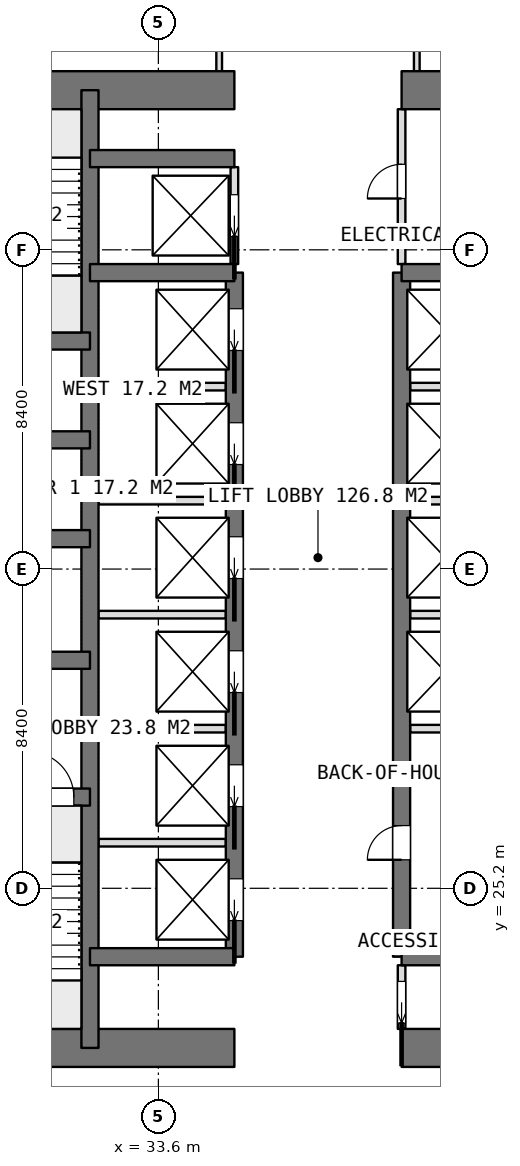
"""IFC4 building model, lengths in metres.
Left out: names, types, materials, properties, quantities, classifications, styles, units other than length and angle.
Written with IfcOpenShell. Run it as: python <this file> out.ifc"""

import sys

from ifc_helpers import new_model, si_unit, direction, frame, frame_2d, origin, place, context, subcontext, project, spatial, rectangle, extrude, element, fill, save


model = new_model("IFC4")
c1 = context("Model", 3, precision=1e-05, world=origin(), true_north=direction((0.0, 1.0)))
c2 = subcontext(c1, "Body", "Model", "MODEL_VIEW")
j1 = project(units=[si_unit("LENGTHUNIT", "METRE"), si_unit("PLANEANGLEUNIT", "RADIAN")], contexts=[c1])
p1 = place(None, origin())
s1 = spatial("IfcSite", under=j1, at=p1, CompositionType="ELEMENT")
p2 = place(p1, origin())
s2 = spatial("IfcBuilding", under=s1, at=p2, CompositionType="ELEMENT")
p3 = place(p2, frame((0.0, 0.0, 125.3)))
s3 = spatial("IfcBuildingStorey", under=s2, at=p3, CompositionType="ELEMENT", Elevation=125.3)
p4 = place(p3, frame((25.2, 21.0, 0.0), z_axis=(0.0, 0.0, 1.0), x_axis=(1.0, 0.0, 0.0)))
e1 = element("IfcWall", 1, at=p4, inside=s3, PredefinedType="SHEAR", context=c2, shape_type="SweptSolid", body=[
    extrude(rectangle(XDim=10.4, YDim=1.0, at=frame_2d((5.2, 0.0))), origin(), (0.0, 0.0, 1.0), 3.75),
])
p5 = place(p3, frame((40.0, 21.0, 0.0), z_axis=(0.0, 0.0, 1.0), x_axis=(1.0, 0.0, 0.0)))
e2 = element("IfcWall", 2, at=p5, inside=s3, PredefinedType="SHEAR", context=c2, shape_type="SweptSolid", body=[
    extrude(rectangle(XDim=10.4, YDim=1.0, at=frame_2d((5.2, 0.0))), origin(), (0.0, 0.0, 1.0), 3.75),
])
p6 = place(p3, frame((25.2, 46.2, 0.0), z_axis=(0.0, 0.0, 1.0), x_axis=(1.0, 0.0, 0.0)))
e3 = element("IfcWall", 3, at=p6, inside=s3, PredefinedType="SHEAR", context=c2, shape_type="SweptSolid", body=[
    extrude(rectangle(XDim=10.4, YDim=1.0, at=frame_2d((5.2, 0.0))), origin(), (0.0, 0.0, 1.0), 3.75),
])
p7 = place(p3, frame((40.0, 46.2, 0.0), z_axis=(0.0, 0.0, 1.0), x_axis=(1.0, 0.0, 0.0)))
e4 = element("IfcWall", 4, at=p7, inside=s3, PredefinedType="SHEAR", context=c2, shape_type="SweptSolid", body=[
    extrude(rectangle(XDim=10.4, YDim=1.0, at=frame_2d((5.2, 0.0))), origin(), (0.0, 0.0, 1.0), 3.75),
])
p8 = place(p3, frame((31.8, 21.0, 0.0), z_axis=(0.0, 0.0, 1.0), x_axis=(0.0, 1.0, 0.0)))
e5 = element("IfcWall", 5, at=p8, inside=s3, PredefinedType="SHEAR", context=c2, shape_type="SweptSolid", body=[
    extrude(rectangle(XDim=25.2, YDim=0.45, at=frame_2d((12.6, 0.0))), origin(), (0.0, 0.0, 1.0), 3.75),
])
p9 = place(p3, frame((35.6, 23.4, 0.0), z_axis=(0.0, 0.0, 1.0), x_axis=(0.0, 1.0, 0.0)))
e6 = element("IfcWall", 6, at=p9, inside=s3, PredefinedType="SHEAR", context=c2, shape_type="SweptSolid", body=[
    extrude(rectangle(XDim=18.0, YDim=0.45, at=frame_2d((9.0, 0.0))), origin(), (0.0, 0.0, 1.0), 3.75),
])
p10 = place(p9, frame((0.95, 0.0, 0.0)))
e7 = element("IfcOpeningElement", 7, at=p10, cuts=e6, PredefinedType="OPENING", context=c2, shape_type="SweptSolid", body=[
    extrude(rectangle(XDim=1.1, YDim=2.1, at=frame_2d((0.55, 1.05))), frame((0.0, 0.235, 0.0), z_axis=(0.0, -1.0, 0.0), x_axis=(1.0, 0.0, 0.0)), (0.0, 0.0, 1.0), 0.47),
])
p11 = place(p9, frame((3.95, 0.0, 0.0)))
e8 = element("IfcOpeningElement", 8, at=p11, cuts=e6, PredefinedType="OPENING", context=c2, shape_type="SweptSolid", body=[
    extrude(rectangle(XDim=1.1, YDim=2.1, at=frame_2d((0.55, 1.05))), frame((0.0, 0.235, 0.0), z_axis=(0.0, -1.0, 0.0), x_axis=(1.0, 0.0, 0.0)), (0.0, 0.0, 1.0), 0.47),
])
p12 = place(p9, frame((6.95, 0.0, 0.0)))
e9 = element("IfcOpeningElement", 9, at=p12, cuts=e6, PredefinedType="OPENING", context=c2, shape_type="SweptSolid", body=[
    extrude(rectangle(XDim=1.1, YDim=2.1, at=frame_2d((0.55, 1.05))), frame((0.0, 0.235, 0.0), z_axis=(0.0, -1.0, 0.0), x_axis=(1.0, 0.0, 0.0)), (0.0, 0.0, 1.0), 0.47),
])
p13 = place(p9, frame((9.95, 0.0, 0.0)))
e10 = element("IfcOpeningElement", 10, at=p13, cuts=e6, PredefinedType="OPENING", context=c2, shape_type="SweptSolid", body=[
    extrude(rectangle(XDim=1.1, YDim=2.1, at=frame_2d((0.55, 1.05))), frame((0.0, 0.235, 0.0), z_axis=(0.0, -1.0, 0.0), x_axis=(1.0, 0.0, 0.0)), (0.0, 0.0, 1.0), 0.47),
])
p14 = place(p9, frame((12.95, 0.0, 0.0)))
e11 = element("IfcOpeningElement", 11, at=p14, cuts=e6, PredefinedType="OPENING", context=c2, shape_type="SweptSolid", body=[
    extrude(rectangle(XDim=1.1, YDim=2.1, at=frame_2d((0.55, 1.05))), frame((0.0, 0.235, 0.0), z_axis=(0.0, -1.0, 0.0), x_axis=(1.0, 0.0, 0.0)), (0.0, 0.0, 1.0), 0.47),
])
p15 = place(p9, frame((15.95, 0.0, 0.0)))
e12 = element("IfcOpeningElement", 12, at=p15, cuts=e6, PredefinedType="OPENING", context=c2, shape_type="SweptSolid", body=[
    extrude(rectangle(XDim=1.1, YDim=2.1, at=frame_2d((0.55, 1.05))), frame((0.0, 0.235, 0.0), z_axis=(0.0, -1.0, 0.0), x_axis=(1.0, 0.0, 0.0)), (0.0, 0.0, 1.0), 0.47),
])
p16 = place(p3, frame((40.0, 23.4, 0.0), z_axis=(0.0, 0.0, 1.0), x_axis=(0.0, 1.0, 0.0)))
e13 = element("IfcWall", 13, at=p16, inside=s3, PredefinedType="SHEAR", context=c2, shape_type="SweptSolid", body=[
    extrude(rectangle(XDim=18.0, YDim=0.45, at=frame_2d((9.0, 0.0))), origin(), (0.0, 0.0, 1.0), 3.75),
])
p17 = place(p16, frame((2.55, 0.0, 0.0)))
e14 = element("IfcOpeningElement", 14, at=p17, cuts=e13, PredefinedType="OPENING", context=c2, shape_type="SweptSolid", body=[
    extrude(rectangle(XDim=0.9, YDim=2.1, at=frame_2d((0.45, 1.05))), frame((0.0, 0.235, 0.0), z_axis=(0.0, -1.0, 0.0), x_axis=(1.0, 0.0, 0.0)), (0.0, 0.0, 1.0), 0.47),
])
for number, where, z_axis, x_axis in (
    (15, (31.8, 23.4, 0.0), (0.0, 0.0, 1.0), (1.0, 0.0, 0.0)),
    (16, (31.8, 41.4, 0.0), (0.0, 0.0, 1.0), (1.0, 0.0, 0.0)),
    (17, (31.8, 44.4, 0.0), (0.0, 0.0, 1.0), (1.0, 0.0, 0.0)),
    (18, (40.0, 23.4, 0.0), (0.0, 0.0, 1.0), (1.0, 0.0, 0.0)),
    (19, (40.0, 41.4, 0.0), (0.0, 0.0, 1.0), (1.0, 0.0, 0.0)),
):
    element("IfcWall", number, at=place(p3, frame(where, z_axis=z_axis, x_axis=x_axis)), inside=s3, PredefinedType="SHEAR", context=c2, shape_type="SweptSolid", body=[
        extrude(rectangle(XDim=3.8, YDim=0.45, at=frame_2d((1.9, 0.0))), origin(), (0.0, 0.0, 1.0), 3.75),
    ])
p18 = place(p3, frame((25.2, 27.6, 0.0), z_axis=(0.0, 0.0, 1.0), x_axis=(1.0, 0.0, 0.0)))
e20 = element("IfcWall", 20, at=p18, inside=s3, PredefinedType="SHEAR", context=c2, shape_type="SweptSolid", body=[
    extrude(rectangle(XDim=6.6, YDim=0.45, at=frame_2d((3.3, 0.0))), origin(), (0.0, 0.0, 1.0), 3.75),
])
p19 = place(p18, frame((4.975, 0.0, 0.0)))
e21 = element("IfcOpeningElement", 21, at=p19, cuts=e20, PredefinedType="OPENING", context=c2, shape_type="SweptSolid", body=[
    extrude(rectangle(XDim=1.2, YDim=2.1, at=frame_2d((0.6, 1.05))), frame((0.0, 0.235, 0.0), z_axis=(0.0, -1.0, 0.0), x_axis=(1.0, 0.0, 0.0)), (0.0, 0.0, 1.0), 0.47),
])
p20 = place(p3, frame((25.2, 31.2, 0.0), z_axis=(0.0, 0.0, 1.0), x_axis=(1.0, 0.0, 0.0)))
e22 = element("IfcWall", 22, at=p20, inside=s3, PredefinedType="SHEAR", context=c2, shape_type="SweptSolid", body=[
    extrude(rectangle(XDim=6.6, YDim=0.45, at=frame_2d((3.3, 0.0))), origin(), (0.0, 0.0, 1.0), 3.75),
])
p21 = place(p20, frame((2.65, 0.0, 0.0)))
e23 = element("IfcOpeningElement", 23, at=p21, cuts=e22, PredefinedType="OPENING", context=c2, shape_type="SweptSolid", body=[
    extrude(rectangle(XDim=1.3, YDim=2.1, at=frame_2d((0.65, 1.05))), frame((0.0, 0.235, 0.0), z_axis=(0.0, -1.0, 0.0), x_axis=(1.0, 0.0, 0.0)), (0.0, 0.0, 1.0), 0.47),
])
for number, where, z_axis, x_axis in (
    (24, (25.2, 34.4, 0.0), (0.0, 0.0, 1.0), (1.0, 0.0, 0.0)),
    (25, (25.2, 37.0, 0.0), (0.0, 0.0, 1.0), (1.0, 0.0, 0.0)),
    (26, (25.2, 39.6, 0.0), (0.0, 0.0, 1.0), (1.0, 0.0, 0.0)),
):
    element("IfcWall", number, at=place(p3, frame(where, z_axis=z_axis, x_axis=x_axis)), inside=s3, PredefinedType="SHEAR", context=c2, shape_type="SweptSolid", body=[
        extrude(rectangle(XDim=6.6, YDim=0.45, at=frame_2d((3.3, 0.0))), origin(), (0.0, 0.0, 1.0), 3.75),
    ])
for number, where, z_axis, x_axis in (
    (27, (32.025, 26.4, 0.0), (0.0, 0.0, 1.0), (1.0, 0.0, 0.0)),
    (28, (32.025, 29.4, 0.0), (0.0, 0.0, 1.0), (1.0, 0.0, 0.0)),
    (29, (32.025, 32.4, 0.0), (0.0, 0.0, 1.0), (1.0, 0.0, 0.0)),
    (30, (32.025, 35.4, 0.0), (0.0, 0.0, 1.0), (1.0, 0.0, 0.0)),
    (31, (32.025, 38.4, 0.0), (0.0, 0.0, 1.0), (1.0, 0.0, 0.0)),
):
    element("IfcWall", number, at=place(p3, frame(where, z_axis=z_axis, x_axis=x_axis)), inside=s3, PredefinedType="PARTITIONING", context=c2, shape_type="SweptSolid", body=[
        extrude(rectangle(XDim=3.35, YDim=0.2, at=frame_2d((1.675, 0.0))), origin(), (0.0, 0.0, 1.0), 3.5),
    ])
for number, where, z_axis, x_axis in (
    (32, (40.225, 29.4, 0.0), (0.0, 0.0, 1.0), (1.0, 0.0, 0.0)),
    (33, (40.225, 32.4, 0.0), (0.0, 0.0, 1.0), (1.0, 0.0, 0.0)),
    (34, (40.225, 35.4, 0.0), (0.0, 0.0, 1.0), (1.0, 0.0, 0.0)),
    (35, (40.225, 38.4, 0.0), (0.0, 0.0, 1.0), (1.0, 0.0, 0.0)),
):
    element("IfcWall", number, at=place(p3, frame(where, z_axis=z_axis, x_axis=x_axis)), inside=s3, PredefinedType="PARTITIONING", context=c2, shape_type="SweptSolid", body=[
        extrude(rectangle(XDim=3.35, YDim=0.2, at=frame_2d((1.675, 0.0))), origin(), (0.0, 0.0, 1.0), 3.5),
    ])
p22 = place(p3, frame((40.0, 21.5, 0.0), z_axis=(0.0, 0.0, 1.0), x_axis=(0.0, 1.0, 0.0)))
e36 = element("IfcWall", 36, at=p22, inside=s3, PredefinedType="PARTITIONING", context=c2, shape_type="SweptSolid", body=[
    extrude(rectangle(XDim=1.675, YDim=0.2, at=frame_2d((0.837, 0.0))), origin(), (0.0, 0.0, 1.0), 3.5),
])
p23 = place(p22, frame((0.15, 0.0, 0.0)))
e37 = element("IfcOpeningElement", 37, at=p23, cuts=e36, PredefinedType="OPENING", context=c2, shape_type="SweptSolid", body=[
    extrude(rectangle(XDim=1.1, YDim=2.1, at=frame_2d((0.55, 1.05))), frame((0.0, 0.11, 0.0), z_axis=(0.0, -1.0, 0.0), x_axis=(1.0, 0.0, 0.0)), (0.0, 0.0, 1.0), 0.22),
])
p24 = place(p3, frame((40.0, 41.625, 0.0), z_axis=(0.0, 0.0, 1.0), x_axis=(0.0, 1.0, 0.0)))
e38 = element("IfcWall", 38, at=p24, inside=s3, PredefinedType="PARTITIONING", context=c2, shape_type="SweptSolid", body=[
    extrude(rectangle(XDim=4.075, YDim=0.2, at=frame_2d((2.038, 0.0))), origin(), (0.0, 0.0, 1.0), 3.5),
])
p25 = place(p24, frame((1.725, 0.0, 0.0)))
e39 = element("IfcOpeningElement", 39, at=p25, cuts=e38, PredefinedType="OPENING", context=c2, shape_type="SweptSolid", body=[
    extrude(rectangle(XDim=0.9, YDim=2.1, at=frame_2d((0.45, 1.05))), frame((0.0, 0.11, 0.0), z_axis=(0.0, -1.0, 0.0), x_axis=(1.0, 0.0, 0.0)), (0.0, 0.0, 1.0), 0.22),
])
p26 = place(p3, frame((35.6, 41.625, 0.0), z_axis=(0.0, 0.0, 1.0), x_axis=(0.0, 1.0, 0.0)))
e40 = element("IfcWall", 40, at=p26, inside=s3, PredefinedType="PARTITIONING", context=c2, shape_type="SweptSolid", body=[
    extrude(rectangle(XDim=2.55, YDim=0.2, at=frame_2d((1.275, 0.0))), origin(), (0.0, 0.0, 1.0), 3.5),
])
p27 = place(p26, frame((0.725, 0.0, 0.0)))
e41 = element("IfcOpeningElement", 41, at=p27, cuts=e40, PredefinedType="OPENING", context=c2, shape_type="SweptSolid", body=[
    extrude(rectangle(XDim=1.1, YDim=2.1, at=frame_2d((0.55, 1.05))), frame((0.0, 0.11, 0.0), z_axis=(0.0, -1.0, 0.0), x_axis=(1.0, 0.0, 0.0)), (0.0, 0.0, 1.0), 0.22),
])
for number, where, z_axis, x_axis in (
    (42, (40.4, 46.7, 0.0), (0.0, 0.0, 1.0), (0.0, 1.0, 0.0)),
    (43, (35.2, 46.7, 0.0), (0.0, 0.0, 1.0), (0.0, 1.0, 0.0)),
):
    element("IfcWall", number, at=place(p3, frame(where, z_axis=z_axis, x_axis=x_axis)), inside=s3, PredefinedType="PARTITIONING", context=c2, shape_type="SweptSolid", body=[
        extrude(rectangle(XDim=2.625, YDim=0.15, at=frame_2d((1.312, 0.0))), origin(), (0.0, 0.0, 1.0), 3.5),
    ])
p28 = place(p23, origin())
e44 = element("IfcDoor", 44, at=p28, inside=s3, OperationType="SLIDING_TO_LEFT", PredefinedType="DOOR", context=c2, shape_type="SweptSolid", body=[
    extrude(rectangle(XDim=1.1, YDim=2.1, at=frame_2d((0.55, 1.05))), frame((0.0, 0.025, 0.0), z_axis=(0.0, -1.0, 0.0), x_axis=(1.0, 0.0, 0.0)), (0.0, 0.0, 1.0), 0.05),
])
fill(e37, e44)
p29 = place(p25, origin())
e45 = element("IfcDoor", 45, at=p29, inside=s3, OperationType="SINGLE_SWING_LEFT", PredefinedType="DOOR", context=c2, shape_type="SweptSolid", body=[
    extrude(rectangle(XDim=0.9, YDim=2.1, at=frame_2d((0.45, 1.05))), frame((0.0, 0.025, 0.0), z_axis=(0.0, -1.0, 0.0), x_axis=(1.0, 0.0, 0.0)), (0.0, 0.0, 1.0), 0.05),
])
fill(e39, e45)
p30 = place(p17, origin())
e46 = element("IfcDoor", 46, at=p30, inside=s3, OperationType="SINGLE_SWING_LEFT", PredefinedType="DOOR", context=c2, shape_type="SweptSolid", body=[
    extrude(rectangle(XDim=0.9, YDim=2.1, at=frame_2d((0.45, 1.05))), frame((0.0, 0.025, 0.0), z_axis=(0.0, -1.0, 0.0), x_axis=(1.0, 0.0, 0.0)), (0.0, 0.0, 1.0), 0.05),
])
fill(e14, e46)
p31 = place(p10, origin())
e47 = element("IfcDoor", 47, at=p31, inside=s3, OperationType="SLIDING_TO_LEFT", PredefinedType="USERDEFINED", context=c2, shape_type="SweptSolid", body=[
    extrude(rectangle(XDim=1.1, YDim=2.1, at=frame_2d((0.55, 1.05))), frame((0.0, 0.025, 0.0), z_axis=(0.0, -1.0, 0.0), x_axis=(1.0, 0.0, 0.0)), (0.0, 0.0, 1.0), 0.05),
])
fill(e7, e47)
p32 = place(p11, origin())
e48 = element("IfcDoor", 48, at=p32, inside=s3, OperationType="SLIDING_TO_LEFT", PredefinedType="USERDEFINED", context=c2, shape_type="SweptSolid", body=[
    extrude(rectangle(XDim=1.1, YDim=2.1, at=frame_2d((0.55, 1.05))), frame((0.0, 0.025, 0.0), z_axis=(0.0, -1.0, 0.0), x_axis=(1.0, 0.0, 0.0)), (0.0, 0.0, 1.0), 0.05),
])
fill(e8, e48)
p33 = place(p12, origin())
e49 = element("IfcDoor", 49, at=p33, inside=s3, OperationType="SLIDING_TO_LEFT", PredefinedType="USERDEFINED", context=c2, shape_type="SweptSolid", body=[
    extrude(rectangle(XDim=1.1, YDim=2.1, at=frame_2d((0.55, 1.05))), frame((0.0, 0.025, 0.0), z_axis=(0.0, -1.0, 0.0), x_axis=(1.0, 0.0, 0.0)), (0.0, 0.0, 1.0), 0.05),
])
fill(e9, e49)
p34 = place(p13, origin())
e50 = element("IfcDoor", 50, at=p34, inside=s3, OperationType="SLIDING_TO_LEFT", PredefinedType="USERDEFINED", context=c2, shape_type="SweptSolid", body=[
    extrude(rectangle(XDim=1.1, YDim=2.1, at=frame_2d((0.55, 1.05))), frame((0.0, 0.025, 0.0), z_axis=(0.0, -1.0, 0.0), x_axis=(1.0, 0.0, 0.0)), (0.0, 0.0, 1.0), 0.05),
])
fill(e10, e50)
p35 = place(p14, origin())
e51 = element("IfcDoor", 51, at=p35, inside=s3, OperationType="SLIDING_TO_LEFT", PredefinedType="USERDEFINED", context=c2, shape_type="SweptSolid", body=[
    extrude(rectangle(XDim=1.1, YDim=2.1, at=frame_2d((0.55, 1.05))), frame((0.0, 0.025, 0.0), z_axis=(0.0, -1.0, 0.0), x_axis=(1.0, 0.0, 0.0)), (0.0, 0.0, 1.0), 0.05),
])
fill(e11, e51)
p36 = place(p15, origin())
e52 = element("IfcDoor", 52, at=p36, inside=s3, OperationType="SLIDING_TO_LEFT", PredefinedType="USERDEFINED", context=c2, shape_type="SweptSolid", body=[
    extrude(rectangle(XDim=1.1, YDim=2.1, at=frame_2d((0.55, 1.05))), frame((0.0, 0.025, 0.0), z_axis=(0.0, -1.0, 0.0), x_axis=(1.0, 0.0, 0.0)), (0.0, 0.0, 1.0), 0.05),
])
fill(e12, e52)
p37 = place(p27, origin())
e53 = element("IfcDoor", 53, at=p37, inside=s3, OperationType="SLIDING_TO_LEFT", PredefinedType="USERDEFINED", context=c2, shape_type="SweptSolid", body=[
    extrude(rectangle(XDim=1.1, YDim=2.1, at=frame_2d((0.55, 1.05))), frame((0.0, 0.025, 0.0), z_axis=(0.0, -1.0, 0.0), x_axis=(1.0, 0.0, 0.0)), (0.0, 0.0, 1.0), 0.05),
])
fill(e41, e53)
p38 = place(p19, origin())
e54 = element("IfcDoor", 54, at=p38, inside=s3, OperationType="SINGLE_SWING_RIGHT", PredefinedType="DOOR", context=c2, shape_type="SweptSolid", body=[
    extrude(rectangle(XDim=1.2, YDim=2.1, at=frame_2d((0.6, 1.05))), frame((0.0, 0.025, 0.0), z_axis=(0.0, -1.0, 0.0), x_axis=(1.0, 0.0, 0.0)), (0.0, 0.0, 1.0), 0.05),
])
fill(e21, e54)
save(model, sys.argv[1])
